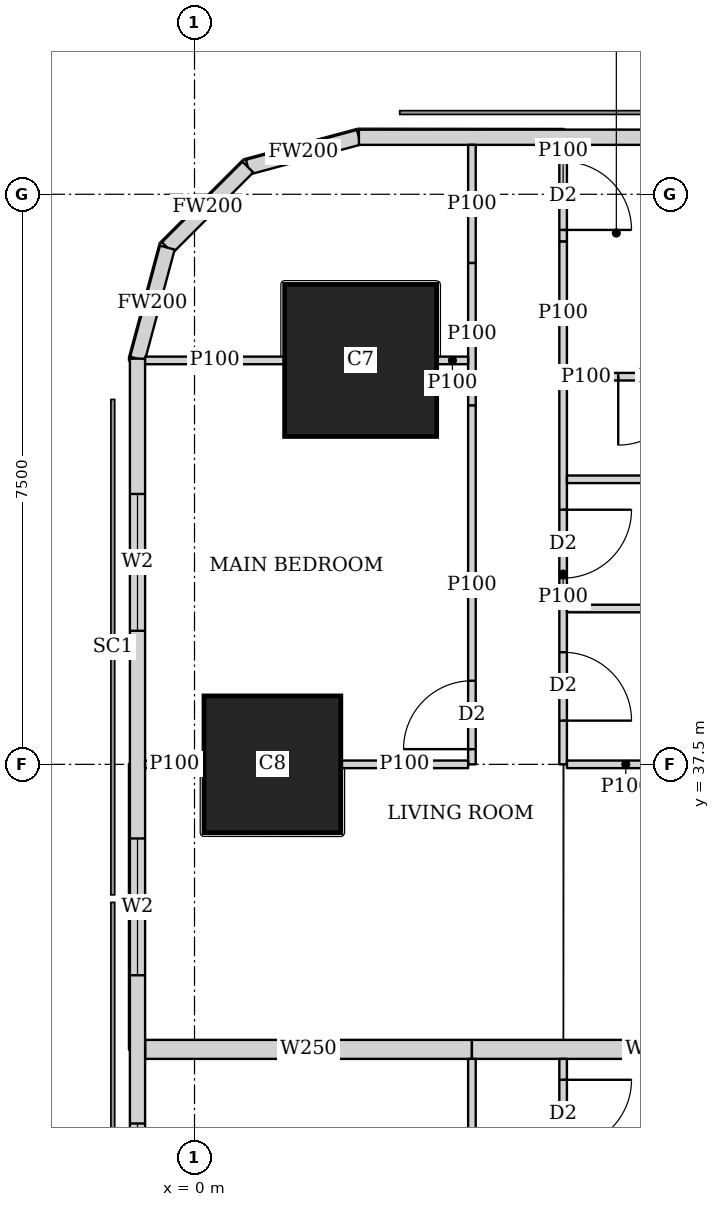
"""IFC4 building model, lengths in metres.
Left out: names, types, materials, properties, quantities, classifications, styles, units other than length and angle.
Written with IfcOpenShell. Run it as: python <this file> out.ifc"""

import sys

from ifc_helpers import new_model, si_unit, direction, frame, frame_2d, origin, origin_2d, place, context, subcontext, project, spatial, rectangle, extrude, element, fill, save


model = new_model("IFC4")
c1 = context("Model", 3, precision=1e-05, world=origin(), true_north=direction((0.0, 1.0)))
c2 = subcontext(c1, "Body", "Model", "MODEL_VIEW")
j1 = project(units=[si_unit("LENGTHUNIT", "METRE"), si_unit("PLANEANGLEUNIT", "RADIAN")], contexts=[c1])
p1 = place(None, origin())
s1 = spatial("IfcSite", under=j1, at=p1, CompositionType="ELEMENT")
p2 = place(p1, origin())
s2 = spatial("IfcBuilding", under=s1, at=p2, CompositionType="ELEMENT")
p3 = place(p2, frame((0.0, 0.0, 139.55)))
s3 = spatial("IfcBuildingStorey", under=s2, at=p3, CompositionType="ELEMENT", Elevation=139.55)
p4 = place(p3, frame((1.025, 37.5, 0.0), z_axis=(0.0, 0.0, 1.0), x_axis=(1.0, 0.0, 0.0)))
e1 = element("IfcColumn", 1, at=p4, inside=s3, PredefinedType="COLUMN", context=c2, shape_type="SweptSolid", body=[
    extrude(rectangle(XDim=1.8, YDim=1.8, at=origin_2d()), origin(), (0.0, 0.0, 1.0), 3.75),
])
p5 = place(p3, frame((2.186, 42.814, 0.0), z_axis=(0.0, 0.0, 1.0), x_axis=(1.0, 0.0, 0.0)))
e2 = element("IfcColumn", 2, at=p5, inside=s3, PredefinedType="COLUMN", context=c2, shape_type="SweptSolid", body=[
    extrude(rectangle(XDim=2.0, YDim=2.0, at=origin_2d()), origin(), (0.0, 0.0, 1.0), 3.75),
])
p6 = place(p3, frame((40.106, 45.75, 0.0), z_axis=(0.0, 0.0, 1.0), x_axis=(-1.0, 0.0, 0.0)))
e3 = element("IfcWall", 3, at=p6, inside=s3, PredefinedType="SOLIDWALL", context=c2, shape_type="SweptSolid", body=[
    extrude(rectangle(XDim=37.943, YDim=0.2, at=frame_2d((18.971, 0.0))), origin(), (0.0, 0.0, 1.0), 3.5),
])
p7 = place(p6, frame((8.606, 0.0, 0.9)))
e4 = element("IfcOpeningElement", 4, at=p7, cuts=e3, PredefinedType="OPENING", context=c2, shape_type="SweptSolid", body=[
    extrude(rectangle(XDim=1.8, YDim=1.5, at=frame_2d((0.9, 0.75))), frame((0.0, 0.11, 0.0), z_axis=(0.0, -1.0, 0.0), x_axis=(1.0, 0.0, 0.0)), (0.0, 0.0, 1.0), 0.22),
])
p8 = place(p6, frame((12.206, 0.0, 0.9)))
e5 = element("IfcOpeningElement", 5, at=p8, cuts=e3, PredefinedType="OPENING", context=c2, shape_type="SweptSolid", body=[
    extrude(rectangle(XDim=1.8, YDim=1.5, at=frame_2d((0.9, 0.75))), frame((0.0, 0.11, 0.0), z_axis=(0.0, -1.0, 0.0), x_axis=(1.0, 0.0, 0.0)), (0.0, 0.0, 1.0), 0.22),
])
p9 = place(p6, frame((15.806, 0.0, 0.9)))
e6 = element("IfcOpeningElement", 6, at=p9, cuts=e3, PredefinedType="OPENING", context=c2, shape_type="SweptSolid", body=[
    extrude(rectangle(XDim=1.8, YDim=1.5, at=frame_2d((0.9, 0.75))), frame((0.0, 0.11, 0.0), z_axis=(0.0, -1.0, 0.0), x_axis=(1.0, 0.0, 0.0)), (0.0, 0.0, 1.0), 0.22),
])
p10 = place(p6, frame((19.406, 0.0, 0.9)))
e7 = element("IfcOpeningElement", 7, at=p10, cuts=e3, PredefinedType="OPENING", context=c2, shape_type="SweptSolid", body=[
    extrude(rectangle(XDim=1.8, YDim=1.5, at=frame_2d((0.9, 0.75))), frame((0.0, 0.11, 0.0), z_axis=(0.0, -1.0, 0.0), x_axis=(1.0, 0.0, 0.0)), (0.0, 0.0, 1.0), 0.22),
])
p11 = place(p6, frame((23.006, 0.0, 0.9)))
e8 = element("IfcOpeningElement", 8, at=p11, cuts=e3, PredefinedType="OPENING", context=c2, shape_type="SweptSolid", body=[
    extrude(rectangle(XDim=1.8, YDim=1.5, at=frame_2d((0.9, 0.75))), frame((0.0, 0.11, 0.0), z_axis=(0.0, -1.0, 0.0), x_axis=(1.0, 0.0, 0.0)), (0.0, 0.0, 1.0), 0.22),
])
p12 = place(p6, frame((26.606, 0.0, 0.9)))
e9 = element("IfcOpeningElement", 9, at=p12, cuts=e3, PredefinedType="OPENING", context=c2, shape_type="SweptSolid", body=[
    extrude(rectangle(XDim=1.8, YDim=1.5, at=frame_2d((0.9, 0.75))), frame((0.0, 0.11, 0.0), z_axis=(0.0, -1.0, 0.0), x_axis=(1.0, 0.0, 0.0)), (0.0, 0.0, 1.0), 0.22),
])
p13 = place(p3, frame((2.163, 45.75, 0.0), z_axis=(0.0, 0.0, 1.0), x_axis=(-0.965832000415, -0.259168954497, 0.0)))
e10 = element("IfcWall", 10, at=p13, inside=s3, PredefinedType="SOLIDWALL", context=c2, shape_type="SweptSolid", body=[
    extrude(rectangle(XDim=1.513, YDim=0.2, at=frame_2d((0.756, 0.0))), origin(), (0.0, 0.0, 1.0), 3.5),
])
p14 = place(p3, frame((0.702, 45.358, 0.0), z_axis=(0.0, 0.0, 1.0), x_axis=(-0.707106781187, -0.707106781187, 0.0)))
e11 = element("IfcWall", 11, at=p14, inside=s3, PredefinedType="SOLIDWALL", context=c2, shape_type="SweptSolid", body=[
    extrude(rectangle(XDim=1.499, YDim=0.2, at=frame_2d((0.75, 0.0))), origin(), (0.0, 0.0, 1.0), 3.5),
])
p15 = place(p3, frame((-0.358, 44.298, 0.0), z_axis=(0.0, 0.0, 1.0), x_axis=(-0.259168954497, -0.965832000415, 0.0)))
e12 = element("IfcWall", 12, at=p15, inside=s3, PredefinedType="SOLIDWALL", context=c2, shape_type="SweptSolid", body=[
    extrude(rectangle(XDim=1.513, YDim=0.2, at=frame_2d((0.756, 0.0))), origin(), (0.0, 0.0, 1.0), 3.5),
])
p16 = place(p3, frame((-0.75, 42.837, 0.0), z_axis=(0.0, 0.0, 1.0), x_axis=(0.0, -1.0, 0.0)))
e13 = element("IfcWall", 13, at=p16, inside=s3, PredefinedType="SOLIDWALL", context=c2, shape_type="SweptSolid", body=[
    extrude(rectangle(XDim=40.674, YDim=0.2, at=frame_2d((20.337, 0.0))), origin(), (0.0, 0.0, 1.0), 3.5),
])
p17 = place(p16, frame((1.78, 0.0, 0.9)))
e14 = element("IfcOpeningElement", 14, at=p17, cuts=e13, PredefinedType="OPENING", context=c2, shape_type="SweptSolid", body=[
    extrude(rectangle(XDim=1.8, YDim=1.5, at=frame_2d((0.9, 0.75))), frame((0.0, 0.11, 0.0), z_axis=(0.0, -1.0, 0.0), x_axis=(1.0, 0.0, 0.0)), (0.0, 0.0, 1.0), 0.22),
])
p18 = place(p16, frame((6.312, 0.0, 0.9)))
e15 = element("IfcOpeningElement", 15, at=p18, cuts=e13, PredefinedType="OPENING", context=c2, shape_type="SweptSolid", body=[
    extrude(rectangle(XDim=1.8, YDim=1.5, at=frame_2d((0.9, 0.75))), frame((0.0, 0.11, 0.0), z_axis=(0.0, -1.0, 0.0), x_axis=(1.0, 0.0, 0.0)), (0.0, 0.0, 1.0), 0.22),
])
p19 = place(p16, frame((10.062, 0.0, 0.9)))
e16 = element("IfcOpeningElement", 16, at=p19, cuts=e13, PredefinedType="OPENING", context=c2, shape_type="SweptSolid", body=[
    extrude(rectangle(XDim=1.8, YDim=1.5, at=frame_2d((0.9, 0.75))), frame((0.0, 0.11, 0.0), z_axis=(0.0, -1.0, 0.0), x_axis=(1.0, 0.0, 0.0)), (0.0, 0.0, 1.0), 0.22),
])
p20 = place(p16, frame((13.812, 0.0, 0.9)))
e17 = element("IfcOpeningElement", 17, at=p20, cuts=e13, PredefinedType="OPENING", context=c2, shape_type="SweptSolid", body=[
    extrude(rectangle(XDim=1.8, YDim=1.5, at=frame_2d((0.9, 0.75))), frame((0.0, 0.11, 0.0), z_axis=(0.0, -1.0, 0.0), x_axis=(1.0, 0.0, 0.0)), (0.0, 0.0, 1.0), 0.22),
])
p21 = place(p16, frame((17.562, 0.0, 0.9)))
e18 = element("IfcOpeningElement", 18, at=p21, cuts=e13, PredefinedType="OPENING", context=c2, shape_type="SweptSolid", body=[
    extrude(rectangle(XDim=1.8, YDim=1.5, at=frame_2d((0.9, 0.75))), frame((0.0, 0.11, 0.0), z_axis=(0.0, -1.0, 0.0), x_axis=(1.0, 0.0, 0.0)), (0.0, 0.0, 1.0), 0.22),
])
p22 = place(p16, frame((21.312, 0.0, 0.9)))
e19 = element("IfcOpeningElement", 19, at=p22, cuts=e13, PredefinedType="OPENING", context=c2, shape_type="SweptSolid", body=[
    extrude(rectangle(XDim=1.8, YDim=1.5, at=frame_2d((0.9, 0.75))), frame((0.0, 0.11, 0.0), z_axis=(0.0, -1.0, 0.0), x_axis=(1.0, 0.0, 0.0)), (0.0, 0.0, 1.0), 0.22),
])
p23 = place(p16, frame((25.062, 0.0, 0.9)))
e20 = element("IfcOpeningElement", 20, at=p23, cuts=e13, PredefinedType="OPENING", context=c2, shape_type="SweptSolid", body=[
    extrude(rectangle(XDim=1.8, YDim=1.5, at=frame_2d((0.9, 0.75))), frame((0.0, 0.11, 0.0), z_axis=(0.0, -1.0, 0.0), x_axis=(1.0, 0.0, 0.0)), (0.0, 0.0, 1.0), 0.22),
])
p24 = place(p16, frame((28.812, 0.0, 0.9)))
e21 = element("IfcOpeningElement", 21, at=p24, cuts=e13, PredefinedType="OPENING", context=c2, shape_type="SweptSolid", body=[
    extrude(rectangle(XDim=1.8, YDim=1.5, at=frame_2d((0.9, 0.75))), frame((0.0, 0.11, 0.0), z_axis=(0.0, -1.0, 0.0), x_axis=(1.0, 0.0, 0.0)), (0.0, 0.0, 1.0), 0.22),
])
p25 = place(p16, frame((32.562, 0.0, 0.9)))
e22 = element("IfcOpeningElement", 22, at=p25, cuts=e13, PredefinedType="OPENING", context=c2, shape_type="SweptSolid", body=[
    extrude(rectangle(XDim=1.8, YDim=1.5, at=frame_2d((0.9, 0.75))), frame((0.0, 0.11, 0.0), z_axis=(0.0, -1.0, 0.0), x_axis=(1.0, 0.0, 0.0)), (0.0, 0.0, 1.0), 0.22),
])
p26 = place(p16, frame((37.094, 0.0, 0.9)))
e23 = element("IfcOpeningElement", 23, at=p26, cuts=e13, PredefinedType="OPENING", context=c2, shape_type="SweptSolid", body=[
    extrude(rectangle(XDim=1.8, YDim=1.5, at=frame_2d((0.9, 0.75))), frame((0.0, 0.11, 0.0), z_axis=(0.0, -1.0, 0.0), x_axis=(1.0, 0.0, 0.0)), (0.0, 0.0, 1.0), 0.22),
])
p27 = place(p3, frame((3.65, 30.0, 0.0), z_axis=(0.0, 0.0, 1.0), x_axis=(0.0, 1.0, 0.0)))
e24 = element("IfcWall", 24, at=p27, inside=s3, PredefinedType="PARTITIONING", context=c2, shape_type="SweptSolid", body=[
    extrude(rectangle(XDim=3.625, YDim=0.1, at=frame_2d((1.812, 0.0))), origin(), (0.0, 0.0, 1.0), 3.5),
])
p28 = place(p27, frame((0.2, 0.0, 0.0)))
e25 = element("IfcOpeningElement", 25, at=p28, cuts=e24, PredefinedType="OPENING", context=c2, shape_type="SweptSolid", body=[
    extrude(rectangle(XDim=0.9, YDim=2.1, at=frame_2d((0.45, 1.05))), frame((0.0, 0.06, 0.0), z_axis=(0.0, -1.0, 0.0), x_axis=(1.0, 0.0, 0.0)), (0.0, 0.0, 1.0), 0.12),
])
p29 = place(p3, frame((4.85, 30.0, 0.0), z_axis=(0.0, 0.0, 1.0), x_axis=(0.0, 1.0, 0.0)))
e26 = element("IfcWall", 26, at=p29, inside=s3, PredefinedType="PARTITIONING", context=c2, shape_type="SweptSolid", body=[
    extrude(rectangle(XDim=3.625, YDim=0.1, at=frame_2d((1.812, 0.0))), origin(), (0.0, 0.0, 1.0), 3.5),
])
p30 = place(p29, frame((0.575, 0.0, 0.0)))
e27 = element("IfcOpeningElement", 27, at=p30, cuts=e26, PredefinedType="OPENING", context=c2, shape_type="SweptSolid", body=[
    extrude(rectangle(XDim=0.9, YDim=2.1, at=frame_2d((0.45, 1.05))), frame((0.0, 0.06, 0.0), z_axis=(0.0, -1.0, 0.0), x_axis=(1.0, 0.0, 0.0)), (0.0, 0.0, 1.0), 0.12),
])
p31 = place(p29, frame((2.45, 0.0, 0.0)))
e28 = element("IfcOpeningElement", 28, at=p31, cuts=e26, PredefinedType="OPENING", context=c2, shape_type="SweptSolid", body=[
    extrude(rectangle(XDim=0.9, YDim=2.1, at=frame_2d((0.45, 1.05))), frame((0.0, 0.06, 0.0), z_axis=(0.0, -1.0, 0.0), x_axis=(1.0, 0.0, 0.0)), (0.0, 0.0, 1.0), 0.12),
])
p32 = place(p3, frame((3.65, 37.5, 0.0), z_axis=(0.0, 0.0, 1.0), x_axis=(0.0, 1.0, 0.0)))
e29 = element("IfcWall", 29, at=p32, inside=s3, PredefinedType="PARTITIONING", context=c2, shape_type="SweptSolid", body=[
    extrude(rectangle(XDim=4.724, YDim=0.1, at=frame_2d((2.362, 0.0))), origin(), (0.0, 0.0, 1.0), 3.5),
])
p33 = place(p32, frame((0.2, 0.0, 0.0)))
e30 = element("IfcOpeningElement", 30, at=p33, cuts=e29, PredefinedType="OPENING", context=c2, shape_type="SweptSolid", body=[
    extrude(rectangle(XDim=0.9, YDim=2.1, at=frame_2d((0.45, 1.05))), frame((0.0, 0.06, 0.0), z_axis=(0.0, -1.0, 0.0), x_axis=(1.0, 0.0, 0.0)), (0.0, 0.0, 1.0), 0.12),
])
p34 = place(p3, frame((3.65, 42.224, 0.0), z_axis=(0.0, 0.0, 1.0), x_axis=(0.0, 1.0, 0.0)))
e31 = element("IfcWall", 31, at=p34, inside=s3, PredefinedType="PARTITIONING", context=c2, shape_type="SweptSolid", body=[
    extrude(rectangle(XDim=1.873, YDim=0.1, at=frame_2d((0.937, 0.0))), origin(), (0.0, 0.0, 1.0), 2.1),
])
p35 = place(p3, frame((3.65, 44.097, 0.0), z_axis=(0.0, 0.0, 1.0), x_axis=(0.0, 1.0, 0.0)))
e32 = element("IfcWall", 32, at=p35, inside=s3, PredefinedType="PARTITIONING", context=c2, shape_type="SweptSolid", body=[
    extrude(rectangle(XDim=1.553, YDim=0.1, at=frame_2d((0.776, 0.0))), origin(), (0.0, 0.0, 1.0), 3.5),
])
p36 = place(p3, frame((4.85, 37.5, 0.0), z_axis=(0.0, 0.0, 1.0), x_axis=(0.0, 1.0, 0.0)))
e33 = element("IfcWall", 33, at=p36, inside=s3, PredefinedType="PARTITIONING", context=c2, shape_type="SweptSolid", body=[
    extrude(rectangle(XDim=5.007, YDim=0.1, at=frame_2d((2.503, 0.0))), origin(), (0.0, 0.0, 1.0), 3.5),
])
p37 = place(p36, frame((0.575, 0.0, 0.0)))
e34 = element("IfcOpeningElement", 34, at=p37, cuts=e33, PredefinedType="OPENING", context=c2, shape_type="SweptSolid", body=[
    extrude(rectangle(XDim=0.9, YDim=2.1, at=frame_2d((0.45, 1.05))), frame((0.0, 0.06, 0.0), z_axis=(0.0, -1.0, 0.0), x_axis=(1.0, 0.0, 0.0)), (0.0, 0.0, 1.0), 0.12),
])
p38 = place(p36, frame((2.45, 0.0, 0.0)))
e35 = element("IfcOpeningElement", 35, at=p38, cuts=e33, PredefinedType="OPENING", context=c2, shape_type="SweptSolid", body=[
    extrude(rectangle(XDim=0.9, YDim=2.1, at=frame_2d((0.45, 1.05))), frame((0.0, 0.06, 0.0), z_axis=(0.0, -1.0, 0.0), x_axis=(1.0, 0.0, 0.0)), (0.0, 0.0, 1.0), 0.12),
])
p39 = place(p3, frame((4.85, 42.507, 0.0), z_axis=(0.0, 0.0, 1.0), x_axis=(0.0, 1.0, 0.0)))
e36 = element("IfcWall", 36, at=p39, inside=s3, PredefinedType="PARTITIONING", context=c2, shape_type="SweptSolid", body=[
    extrude(rectangle(XDim=1.874, YDim=0.1, at=frame_2d((0.937, 0.0))), origin(), (0.0, 0.0, 1.0), 2.1),
])
p40 = place(p3, frame((4.85, 44.381, 0.0), z_axis=(0.0, 0.0, 1.0), x_axis=(0.0, 1.0, 0.0)))
e37 = element("IfcWall", 37, at=p40, inside=s3, PredefinedType="PARTITIONING", context=c2, shape_type="SweptSolid", body=[
    extrude(rectangle(XDim=1.269, YDim=0.1, at=frame_2d((0.634, 0.0))), origin(), (0.0, 0.0, 1.0), 3.5),
])
p41 = place(p40, frame((0.15, 0.0, 0.0)))
e38 = element("IfcOpeningElement", 38, at=p41, cuts=e37, PredefinedType="OPENING", context=c2, shape_type="SweptSolid", body=[
    extrude(rectangle(XDim=0.9, YDim=2.1, at=frame_2d((0.45, 1.05))), frame((0.0, 0.06, 0.0), z_axis=(0.0, -1.0, 0.0), x_axis=(1.0, 0.0, 0.0)), (0.0, 0.0, 1.0), 0.12),
])
p42 = place(p3, frame((-0.65, 37.5, 0.0), z_axis=(0.0, 0.0, 1.0), x_axis=(1.0, 0.0, 0.0)))
e39 = element("IfcWall", 39, at=p42, inside=s3, PredefinedType="PARTITIONING", context=c2, shape_type="SweptSolid", body=[
    extrude(rectangle(XDim=0.774, YDim=0.1, at=frame_2d((0.387, 0.0))), origin(), (0.0, 0.0, 1.0), 3.5),
])
p43 = place(p3, frame((1.926, 37.5, 0.0), z_axis=(0.0, 0.0, 1.0), x_axis=(1.0, 0.0, 0.0)))
e40 = element("IfcWall", 40, at=p43, inside=s3, PredefinedType="PARTITIONING", context=c2, shape_type="SweptSolid", body=[
    extrude(rectangle(XDim=1.674, YDim=0.1, at=frame_2d((0.837, 0.0))), origin(), (0.0, 0.0, 1.0), 2.1),
])
p44 = place(p3, frame((-0.65, 42.814, 0.0), z_axis=(0.0, 0.0, 1.0), x_axis=(1.0, 0.0, 0.0)))
e41 = element("IfcWall", 41, at=p44, inside=s3, PredefinedType="PARTITIONING", context=c2, shape_type="SweptSolid", body=[
    extrude(rectangle(XDim=1.835, YDim=0.1, at=frame_2d((0.917, 0.0))), origin(), (0.0, 0.0, 1.0), 3.5),
])
p45 = place(p3, frame((3.187, 42.814, 0.0), z_axis=(0.0, 0.0, 1.0), x_axis=(1.0, 0.0, 0.0)))
e42 = element("IfcWall", 42, at=p45, inside=s3, PredefinedType="PARTITIONING", context=c2, shape_type="SweptSolid", body=[
    extrude(rectangle(XDim=0.413, YDim=0.1, at=frame_2d((0.207, 0.0))), origin(), (0.0, 0.0, 1.0), 2.1),
])
p46 = place(p3, frame((4.9, 37.5, 0.0), z_axis=(0.0, 0.0, 1.0), x_axis=(1.0, 0.0, 0.0)))
e43 = element("IfcWall", 43, at=p46, inside=s3, PredefinedType="PARTITIONING", context=c2, shape_type="SweptSolid", body=[
    extrude(rectangle(XDim=1.549, YDim=0.1, at=frame_2d((0.774, 0.0))), origin(), (0.0, 0.0, 1.0), 3.5),
])
for number, where, z_axis, x_axis in (
    (44, (4.9, 41.25, 0.0), (0.0, 0.0, 1.0), (1.0, 0.0, 0.0)),
    (45, (4.9, 39.55, 0.0), (0.0, 0.0, 1.0), (1.0, 0.0, 0.0)),
):
    element("IfcWall", number, at=place(p3, frame(where, z_axis=z_axis, x_axis=x_axis)), inside=s3, PredefinedType="PARTITIONING", context=c2, shape_type="SweptSolid", body=[
        extrude(rectangle(XDim=3.525, YDim=0.1, at=frame_2d((1.763, 0.0))), origin(), (0.0, 0.0, 1.0), 3.5),
    ])
p47 = place(p3, frame((-0.65, 33.75, 0.0), z_axis=(0.0, 0.0, 1.0), x_axis=(1.0, 0.0, 0.0)))
e46 = element("IfcWall", 46, at=p47, inside=s3, PredefinedType="SOLIDWALL", context=c2, shape_type="SweptSolid", body=[
    extrude(rectangle(XDim=4.3, YDim=0.25, at=frame_2d((2.15, 0.0))), origin(), (0.0, 0.0, 1.0), 2.1),
])
p48 = place(p3, frame((3.65, 33.75, 0.0), z_axis=(0.0, 0.0, 1.0), x_axis=(1.0, 0.0, 0.0)))
e47 = element("IfcWall", 47, at=p48, inside=s3, PredefinedType="SOLIDWALL", context=c2, shape_type="SweptSolid", body=[
    extrude(rectangle(XDim=4.775, YDim=0.25, at=frame_2d((2.388, 0.0))), origin(), (0.0, 0.0, 1.0), 3.5),
])
p49 = place(p3, frame((8.425, 42.6, 0.0), z_axis=(0.0, 0.0, 1.0), x_axis=(-1.0, 0.0, 0.0)))
e48 = element("IfcWall", 48, at=p49, inside=s3, PredefinedType="PARTITIONING", context=c2, shape_type="SweptSolid", body=[
    extrude(rectangle(XDim=3.022, YDim=0.1, at=frame_2d((1.511, 0.0))), origin(), (0.0, 0.0, 1.0), 3.5),
])
p50 = place(p49, frame((1.95, 0.0, 0.0)))
e49 = element("IfcOpeningElement", 49, at=p50, cuts=e48, PredefinedType="OPENING", context=c2, shape_type="SweptSolid", body=[
    extrude(rectangle(XDim=0.9, YDim=2.1, at=frame_2d((0.45, 1.05))), frame((0.0, 0.06, 0.0), z_axis=(0.0, -1.0, 0.0), x_axis=(1.0, 0.0, 0.0)), (0.0, 0.0, 1.0), 0.12),
])
p51 = place(p3, frame((5.403, 42.6, 0.0), z_axis=(0.0, 0.0, 1.0), x_axis=(-1.0, 0.0, 0.0)))
e50 = element("IfcWall", 50, at=p51, inside=s3, PredefinedType="PARTITIONING", context=c2, shape_type="SweptSolid", body=[
    extrude(rectangle(XDim=0.503, YDim=0.1, at=frame_2d((0.251, 0.0))), origin(), (0.0, 0.0, 1.0), 2.1),
])
p52 = place(p17, origin())
e51 = element("IfcWindow", 51, at=p52, inside=s3, PartitioningType="SINGLE_PANEL", PredefinedType="WINDOW", context=c2, shape_type="SweptSolid", body=[
    extrude(rectangle(XDim=1.8, YDim=1.5, at=frame_2d((0.9, 0.75))), frame((0.0, 0.03, 0.0), z_axis=(0.0, -1.0, 0.0), x_axis=(1.0, 0.0, 0.0)), (0.0, 0.0, 1.0), 0.06),
])
fill(e14, e51)
p53 = place(p18, origin())
e52 = element("IfcWindow", 52, at=p53, inside=s3, PartitioningType="SINGLE_PANEL", PredefinedType="WINDOW", context=c2, shape_type="SweptSolid", body=[
    extrude(rectangle(XDim=1.8, YDim=1.5, at=frame_2d((0.9, 0.75))), frame((0.0, 0.03, 0.0), z_axis=(0.0, -1.0, 0.0), x_axis=(1.0, 0.0, 0.0)), (0.0, 0.0, 1.0), 0.06),
])
fill(e15, e52)
p54 = place(p19, origin())
e53 = element("IfcWindow", 53, at=p54, inside=s3, PartitioningType="SINGLE_PANEL", PredefinedType="WINDOW", context=c2, shape_type="SweptSolid", body=[
    extrude(rectangle(XDim=1.8, YDim=1.5, at=frame_2d((0.9, 0.75))), frame((0.0, 0.03, 0.0), z_axis=(0.0, -1.0, 0.0), x_axis=(1.0, 0.0, 0.0)), (0.0, 0.0, 1.0), 0.06),
])
fill(e16, e53)
p55 = place(p31, origin())
e54 = element("IfcDoor", 54, at=p55, inside=s3, OperationType="SINGLE_SWING_LEFT", PredefinedType="DOOR", context=c2, shape_type="SweptSolid", body=[
    extrude(rectangle(XDim=0.9, YDim=2.1, at=frame_2d((0.45, 1.05))), frame((0.0, 0.025, 0.0), z_axis=(0.0, -1.0, 0.0), x_axis=(1.0, 0.0, 0.0)), (0.0, 0.0, 1.0), 0.05),
])
fill(e28, e54)
p56 = place(p33, origin())
e55 = element("IfcDoor", 55, at=p56, inside=s3, OperationType="SINGLE_SWING_LEFT", PredefinedType="DOOR", context=c2, shape_type="SweptSolid", body=[
    extrude(rectangle(XDim=0.9, YDim=2.1, at=frame_2d((0.45, 1.05))), frame((0.0, 0.025, 0.0), z_axis=(0.0, -1.0, 0.0), x_axis=(1.0, 0.0, 0.0)), (0.0, 0.0, 1.0), 0.05),
])
fill(e30, e55)
p57 = place(p37, origin())
e56 = element("IfcDoor", 56, at=p57, inside=s3, OperationType="SINGLE_SWING_RIGHT", PredefinedType="DOOR", context=c2, shape_type="SweptSolid", body=[
    extrude(rectangle(XDim=0.9, YDim=2.1, at=frame_2d((0.45, 1.05))), frame((0.0, 0.025, 0.0), z_axis=(0.0, -1.0, 0.0), x_axis=(1.0, 0.0, 0.0)), (0.0, 0.0, 1.0), 0.05),
])
fill(e34, e56)
p58 = place(p41, origin())
e57 = element("IfcDoor", 57, at=p58, inside=s3, OperationType="SINGLE_SWING_RIGHT", PredefinedType="DOOR", context=c2, shape_type="SweptSolid", body=[
    extrude(rectangle(XDim=0.9, YDim=2.1, at=frame_2d((0.45, 1.05))), frame((0.0, 0.025, 0.0), z_axis=(0.0, -1.0, 0.0), x_axis=(1.0, 0.0, 0.0)), (0.0, 0.0, 1.0), 0.05),
])
fill(e38, e57)
p59 = place(p38, origin())
e58 = element("IfcDoor", 58, at=p59, inside=s3, OperationType="SINGLE_SWING_LEFT", PredefinedType="DOOR", context=c2, shape_type="SweptSolid", body=[
    extrude(rectangle(XDim=0.9, YDim=2.1, at=frame_2d((0.45, 1.05))), frame((0.0, 0.025, 0.0), z_axis=(0.0, -1.0, 0.0), x_axis=(1.0, 0.0, 0.0)), (0.0, 0.0, 1.0), 0.05),
])
fill(e35, e58)
p60 = place(p50, origin())
e59 = element("IfcDoor", 59, at=p60, inside=s3, OperationType="SINGLE_SWING_RIGHT", PredefinedType="DOOR", context=c2, shape_type="SweptSolid", body=[
    extrude(rectangle(XDim=0.9, YDim=2.1, at=frame_2d((0.45, 1.05))), frame((0.0, 0.025, 0.0), z_axis=(0.0, -1.0, 0.0), x_axis=(1.0, 0.0, 0.0)), (0.0, 0.0, 1.0), 0.05),
])
fill(e49, e59)
save(model, sys.argv[1])
